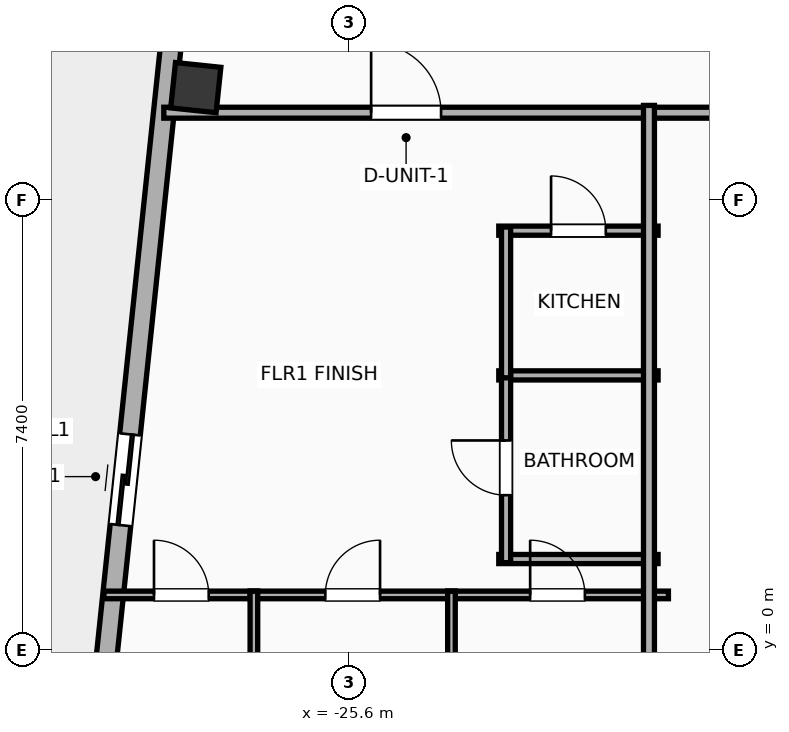
"""IFC4 building model, lengths in metres.
Left out: names, types, materials, properties, quantities, classifications, styles, units other than length and angle.
Written with IfcOpenShell. Run it as: python <this file> out.ifc"""

import sys

from ifc_helpers import new_model, si_unit, direction, frame, frame_2d, origin, origin_2d, place, context, subcontext, project, spatial, rectangle, hollow_rectangle, extrude, element, fill, save


model = new_model("IFC4")
c1 = context("Model", 3, precision=1e-05, world=origin(), true_north=direction((0.0, 1.0)))
c2 = subcontext(c1, "Body", "Model", "MODEL_VIEW")
j1 = project(units=[si_unit("LENGTHUNIT", "METRE"), si_unit("PLANEANGLEUNIT", "RADIAN")], contexts=[c1])
p1 = place(None, origin())
s1 = spatial("IfcSite", under=j1, at=p1, CompositionType="ELEMENT")
p2 = place(p1, origin())
s2 = spatial("IfcBuilding", under=s1, at=p2, CompositionType="ELEMENT")
p3 = place(p2, frame((0.0, 0.0, 291.2)))
s3 = spatial("IfcBuildingStorey", under=s2, at=p3, CompositionType="ELEMENT", Elevation=291.2)
p4 = place(p3, frame((-28.123, 9.252, 0.0), z_axis=(0.0, 0.0, 1.0), x_axis=(0.994521895368, -0.104528463268, 0.0)))
e1 = element("IfcColumn", 1, at=p4, inside=s3, PredefinedType="COLUMN", context=c2, shape_type="SweptSolid", body=[
    extrude(hollow_rectangle(XDim=0.75, YDim=0.75, WallThickness=0.025, at=origin_2d()), origin(), (0.0, 0.0, 1.0), 3.9),
])
p5 = place(p3, frame((-30.87, -12.296, 0.0), z_axis=(0.0, 0.0, 1.0), x_axis=(0.104533282919, 0.994521388791, 0.0)))
e2 = element("IfcWall", 2, at=p5, inside=s3, PredefinedType="ELEMENTEDWALL", context=c2, shape_type="SweptSolid", body=[
    extrude(rectangle(XDim=30.366, YDim=0.34, at=frame_2d((15.183, 0.0))), origin(), (0.0, 0.0, 1.0), 3.635),
])
p6 = place(p5, frame((14.433, 0.0, 0.0)))
e3 = element("IfcOpeningElement", 3, at=p6, cuts=e2, PredefinedType="OPENING", context=c2, shape_type="SweptSolid", body=[
    extrude(rectangle(XDim=1.5, YDim=2.05, at=frame_2d((0.75, 1.025))), frame((0.0, 0.18, 0.0), z_axis=(0.0, -1.0, 0.0), x_axis=(1.0, 0.0, 0.0)), (0.0, 0.0, 1.0), 0.36),
])
p7 = place(p5, frame((5.442, 0.0, 0.65)))
e4 = element("IfcOpeningElement", 4, at=p7, cuts=e2, PredefinedType="OPENING", context=c2, shape_type="SweptSolid", body=[
    extrude(rectangle(XDim=2.6, YDim=2.45, at=frame_2d((1.3, 1.225))), frame((0.0, 0.18, 0.0), z_axis=(0.0, -1.0, 0.0), x_axis=(1.0, 0.0, 0.0)), (0.0, 0.0, 1.0), 0.36),
])
p8 = place(p5, frame((26.861, 0.0, 0.75)))
e5 = element("IfcOpeningElement", 5, at=p8, cuts=e2, PredefinedType="OPENING", context=c2, shape_type="SweptSolid", body=[
    extrude(rectangle(XDim=1.2, YDim=2.05, at=frame_2d((0.6, 1.025))), frame((0.0, 0.18, 0.0), z_axis=(0.0, -1.0, 0.0), x_axis=(1.0, 0.0, 0.0)), (0.0, 0.0, 1.0), 0.36),
])
p9 = place(p3, frame((-28.649, 8.84, 0.0), z_axis=(0.0, 0.0, 1.0), x_axis=(1.0, 0.0, 0.0)))
e6 = element("IfcWall", 6, at=p9, inside=s3, PredefinedType="PARTITIONING", context=c2, shape_type="SweptSolid", body=[
    extrude(rectangle(XDim=18.769, YDim=0.18, at=frame_2d((9.384, 0.0))), origin(), (0.0, 0.0, 1.0), 3.075),
])
p10 = place(p9, frame((3.41, 0.0, 0.0)))
e7 = element("IfcOpeningElement", 7, at=p10, cuts=e6, PredefinedType="OPENING", context=c2, shape_type="SweptSolid", body=[
    extrude(rectangle(XDim=1.15, YDim=2.05, at=frame_2d((0.575, 1.025))), frame((0.0, 0.1, 0.0), z_axis=(0.0, -1.0, 0.0), x_axis=(1.0, 0.0, 0.0)), (0.0, 0.0, 1.0), 0.2),
])
p11 = place(p3, frame((-23.14, 6.9, 0.0), z_axis=(0.0, 0.0, 1.0), x_axis=(1.0, 0.0, 0.0)))
e8 = element("IfcWall", 8, at=p11, inside=s3, PredefinedType="PLUMBINGWALL", context=c2, shape_type="SweptSolid", body=[
    extrude(rectangle(XDim=2.62, YDim=0.15, at=frame_2d((1.31, 0.0))), origin(), (0.0, 0.0, 1.0), 3.635),
])
p12 = place(p11, frame((0.86, 0.0, 0.0)))
e9 = element("IfcOpeningElement", 9, at=p12, cuts=e8, PredefinedType="OPENING", context=c2, shape_type="SweptSolid", body=[
    extrude(rectangle(XDim=0.9, YDim=2.05, at=frame_2d((0.45, 1.025))), frame((0.0, 0.085, 0.0), z_axis=(0.0, -1.0, 0.0), x_axis=(1.0, 0.0, 0.0)), (0.0, 0.0, 1.0), 0.17),
])
for number, where, z_axis, x_axis in (
    (10, (-23.14, 4.52, 0.0), (0.0, 0.0, 1.0), (1.0, 0.0, 0.0)),
    (11, (-23.14, 1.5, 0.0), (0.0, 0.0, 1.0), (1.0, 0.0, 0.0)),
):
    element("IfcWall", number, at=place(p3, frame(where, z_axis=z_axis, x_axis=x_axis)), inside=s3, PredefinedType="PLUMBINGWALL", context=c2, shape_type="SweptSolid", body=[
        extrude(rectangle(XDim=2.62, YDim=0.15, at=frame_2d((1.31, 0.0))), origin(), (0.0, 0.0, 1.0), 3.635),
    ])
p13 = place(p3, frame((-23.02, 1.44, 0.0), z_axis=(0.0, 0.0, 1.0), x_axis=(0.0, 1.0, 0.0)))
e12 = element("IfcWall", 12, at=p13, inside=s3, PredefinedType="PLUMBINGWALL", context=c2, shape_type="SweptSolid", body=[
    extrude(rectangle(XDim=3.12, YDim=0.15, at=frame_2d((1.56, 0.0))), origin(), (0.0, 0.0, 1.0), 3.635),
])
p14 = place(p13, frame((1.11, 0.0, 0.0)))
e13 = element("IfcOpeningElement", 13, at=p14, cuts=e12, PredefinedType="OPENING", context=c2, shape_type="SweptSolid", body=[
    extrude(rectangle(XDim=0.9, YDim=2.05, at=frame_2d((0.45, 1.025))), frame((0.0, 0.085, 0.0), z_axis=(0.0, -1.0, 0.0), x_axis=(1.0, 0.0, 0.0)), (0.0, 0.0, 1.0), 0.17),
])
p15 = place(p3, frame((-23.02, 4.48, 0.0), z_axis=(0.0, 0.0, 1.0), x_axis=(0.0, 1.0, 0.0)))
e14 = element("IfcWall", 14, at=p15, inside=s3, PredefinedType="PLUMBINGWALL", context=c2, shape_type="SweptSolid", body=[
    extrude(rectangle(XDim=2.48, YDim=0.15, at=frame_2d((1.24, 0.0))), origin(), (0.0, 0.0, 1.0), 3.635),
])
p16 = place(p3, frame((-29.633, 0.91, 0.0), z_axis=(0.0, 0.0, 1.0), x_axis=(1.0, 0.0, 0.0)))
e15 = element("IfcWall", 15, at=p16, inside=s3, PredefinedType="PARTITIONING", context=c2, shape_type="SweptSolid", body=[
    extrude(rectangle(XDim=2.529, YDim=0.125, at=frame_2d((1.264, 0.0))), origin(), (0.0, 0.0, 1.0), 3.635),
])
p17 = place(p16, frame((0.823, 0.0, 0.0)))
e16 = element("IfcOpeningElement", 16, at=p17, cuts=e15, PredefinedType="OPENING", context=c2, shape_type="SweptSolid", body=[
    extrude(rectangle(XDim=0.9, YDim=2.05, at=frame_2d((0.45, 1.025))), frame((0.0, 0.073, 0.0), z_axis=(0.0, -1.0, 0.0), x_axis=(1.0, 0.0, 0.0)), (0.0, 0.0, 1.0), 0.145),
])
p18 = place(p3, frame((-27.229, 0.91, 0.0), z_axis=(0.0, 0.0, 1.0), x_axis=(1.0, 0.0, 0.0)))
e17 = element("IfcWall", 17, at=p18, inside=s3, PredefinedType="PARTITIONING", context=c2, shape_type="SweptSolid", body=[
    extrude(rectangle(XDim=3.374, YDim=0.125, at=frame_2d((1.687, 0.0))), origin(), (0.0, 0.0, 1.0), 3.635),
])
p19 = place(p18, frame((1.237, 0.0, 0.0)))
e18 = element("IfcOpeningElement", 18, at=p19, cuts=e17, PredefinedType="OPENING", context=c2, shape_type="SweptSolid", body=[
    extrude(rectangle(XDim=0.9, YDim=2.05, at=frame_2d((0.45, 1.025))), frame((0.0, 0.073, 0.0), z_axis=(0.0, -1.0, 0.0), x_axis=(1.0, 0.0, 0.0)), (0.0, 0.0, 1.0), 0.145),
])
p20 = place(p3, frame((-23.98, 0.91, 0.0), z_axis=(0.0, 0.0, 1.0), x_axis=(1.0, 0.0, 0.0)))
e19 = element("IfcWall", 19, at=p20, inside=s3, PredefinedType="PARTITIONING", context=c2, shape_type="SweptSolid", body=[
    extrude(rectangle(XDim=3.63, YDim=0.125, at=frame_2d((1.815, 0.0))), origin(), (0.0, 0.0, 1.0), 3.635),
])
p21 = place(p20, frame((1.356, 0.0, 0.0)))
e20 = element("IfcOpeningElement", 20, at=p21, cuts=e19, PredefinedType="OPENING", context=c2, shape_type="SweptSolid", body=[
    extrude(rectangle(XDim=0.9, YDim=2.05, at=frame_2d((0.45, 1.025))), frame((0.0, 0.073, 0.0), z_axis=(0.0, -1.0, 0.0), x_axis=(1.0, 0.0, 0.0)), (0.0, 0.0, 1.0), 0.145),
])
for number, where, z_axis, x_axis in (
    (21, (-23.918, -9.16, 0.0), (0.0, 0.0, 1.0), (0.0, 1.0, 0.0)),
    (22, (-27.167, -9.16, 0.0), (0.0, 0.0, 1.0), (0.0, 1.0, 0.0)),
):
    element("IfcWall", number, at=place(p3, frame(where, z_axis=z_axis, x_axis=x_axis)), inside=s3, PredefinedType="PARTITIONING", context=c2, shape_type="SweptSolid", body=[
        extrude(rectangle(XDim=10.13, YDim=0.125, at=frame_2d((5.065, 0.0))), origin(), (0.0, 0.0, 1.0), 3.635),
    ])
p22 = place(p3, frame((-20.67, -8.96, 0.0), z_axis=(0.0, 0.0, 1.0), x_axis=(0.0, 1.0, 0.0)))
e23 = element("IfcWall", 23, at=p22, inside=s3, PredefinedType="PARTITIONING", context=c2, shape_type="SweptSolid", body=[
    extrude(rectangle(XDim=17.92, YDim=0.18, at=frame_2d((8.96, 0.0))), origin(), (0.0, 0.0, 1.0), 3.635),
])
p23 = place(p6, origin())
e24 = element("IfcDoor", 24, at=p23, inside=s3, OperationType="SLIDING_TO_RIGHT", PredefinedType="DOOR", context=c2, shape_type="SweptSolid", body=[
    extrude(rectangle(XDim=1.5, YDim=2.05, at=frame_2d((0.75, 1.025))), frame((0.0, 0.025, 0.0), z_axis=(0.0, -1.0, 0.0), x_axis=(1.0, 0.0, 0.0)), (0.0, 0.0, 1.0), 0.05),
])
fill(e3, e24)
p24 = place(p10, origin())
e25 = element("IfcDoor", 25, at=p24, inside=s3, OperationType="SINGLE_SWING_LEFT", PredefinedType="DOOR", context=c2, shape_type="SweptSolid", body=[
    extrude(rectangle(XDim=1.15, YDim=2.05, at=frame_2d((0.575, 1.025))), frame((0.0, 0.025, 0.0), z_axis=(0.0, -1.0, 0.0), x_axis=(1.0, 0.0, 0.0)), (0.0, 0.0, 1.0), 0.05),
])
fill(e7, e25)
p25 = place(p12, origin())
e26 = element("IfcDoor", 26, at=p25, inside=s3, OperationType="SINGLE_SWING_LEFT", PredefinedType="DOOR", context=c2, shape_type="SweptSolid", body=[
    extrude(rectangle(XDim=0.9, YDim=2.05, at=frame_2d((0.45, 1.025))), frame((0.0, 0.025, 0.0), z_axis=(0.0, -1.0, 0.0), x_axis=(1.0, 0.0, 0.0)), (0.0, 0.0, 1.0), 0.05),
])
fill(e9, e26)
p26 = place(p14, origin())
e27 = element("IfcDoor", 27, at=p26, inside=s3, OperationType="SINGLE_SWING_RIGHT", PredefinedType="DOOR", context=c2, shape_type="SweptSolid", body=[
    extrude(rectangle(XDim=0.9, YDim=2.05, at=frame_2d((0.45, 1.025))), frame((0.0, 0.025, 0.0), z_axis=(0.0, -1.0, 0.0), x_axis=(1.0, 0.0, 0.0)), (0.0, 0.0, 1.0), 0.05),
])
fill(e13, e27)
p27 = place(p17, origin())
e28 = element("IfcDoor", 28, at=p27, inside=s3, OperationType="SINGLE_SWING_LEFT", PredefinedType="DOOR", context=c2, shape_type="SweptSolid", body=[
    extrude(rectangle(XDim=0.9, YDim=2.05, at=frame_2d((0.45, 1.025))), frame((0.0, 0.025, 0.0), z_axis=(0.0, -1.0, 0.0), x_axis=(1.0, 0.0, 0.0)), (0.0, 0.0, 1.0), 0.05),
])
fill(e16, e28)
p28 = place(p19, origin())
e29 = element("IfcDoor", 29, at=p28, inside=s3, OperationType="SINGLE_SWING_RIGHT", PredefinedType="DOOR", context=c2, shape_type="SweptSolid", body=[
    extrude(rectangle(XDim=0.9, YDim=2.05, at=frame_2d((0.45, 1.025))), frame((0.0, 0.025, 0.0), z_axis=(0.0, -1.0, 0.0), x_axis=(1.0, 0.0, 0.0)), (0.0, 0.0, 1.0), 0.05),
])
fill(e18, e29)
p29 = place(p21, origin())
e30 = element("IfcDoor", 30, at=p29, inside=s3, OperationType="SINGLE_SWING_LEFT", PredefinedType="DOOR", context=c2, shape_type="SweptSolid", body=[
    extrude(rectangle(XDim=0.9, YDim=2.05, at=frame_2d((0.45, 1.025))), frame((0.0, 0.025, 0.0), z_axis=(0.0, -1.0, 0.0), x_axis=(1.0, 0.0, 0.0)), (0.0, 0.0, 1.0), 0.05),
])
fill(e20, e30)
save(model, sys.argv[1])
